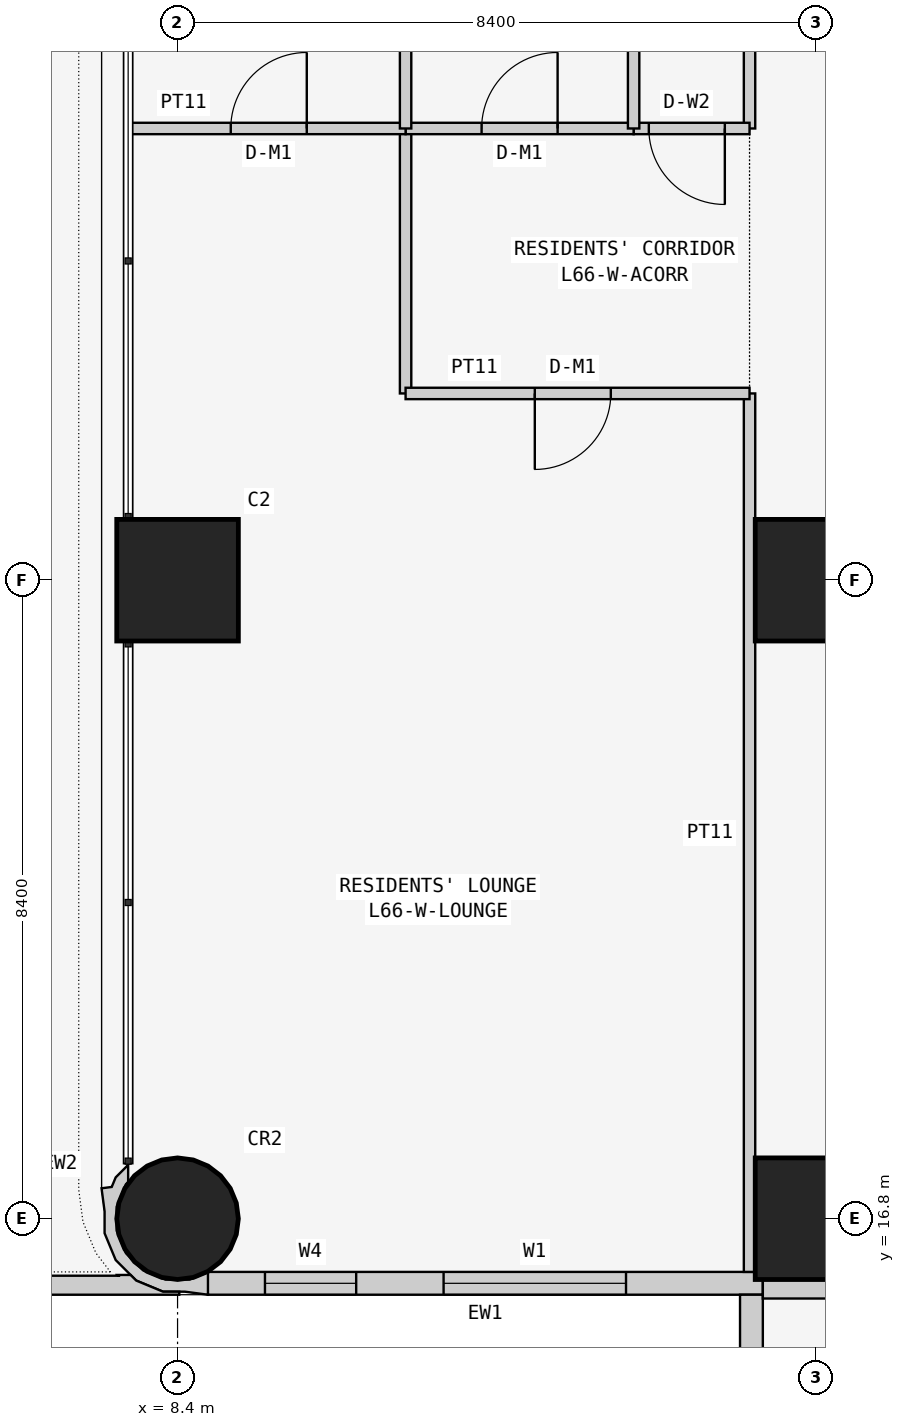
"""IFC4 building model, lengths in metres.
Left out: names, types, materials, properties, quantities, classifications, styles, units other than length and angle.
Written with IfcOpenShell. Run it as: python <this file> out.ifc"""

import sys

from ifc_helpers import new_model, si_unit, direction, frame, frame_2d, origin, origin_2d, place, context, subcontext, project, spatial, polyline, rectangle, circle, outline, extrude, element, fill, save


model = new_model("IFC4")
c1 = context("Model", 3, precision=1e-05, world=origin(), true_north=direction((0.0, 1.0)))
c2 = subcontext(c1, "Body", "Model", "MODEL_VIEW")
j1 = project(units=[si_unit("LENGTHUNIT", "METRE"), si_unit("PLANEANGLEUNIT", "RADIAN")], contexts=[c1])
p1 = place(None, origin())
s1 = spatial("IfcSite", under=j1, at=p1, CompositionType="ELEMENT")
p2 = place(p1, origin())
s2 = spatial("IfcBuilding", under=s1, at=p2, CompositionType="ELEMENT")
p3 = place(p2, frame((0.0, 0.0, 254.1)))
s3 = spatial("IfcBuildingStorey", under=s2, at=p3, CompositionType="ELEMENT", Elevation=254.1)
p4 = place(p3, frame((8.4, 16.8, 0.0), z_axis=(0.0, 0.0, 1.0), x_axis=(1.0, 0.0, 0.0)))
e1 = element("IfcColumn", 1, at=p4, inside=s3, PredefinedType="COLUMN", context=c2, shape_type="SweptSolid", body=[
    extrude(circle(Radius=0.8, at=origin_2d()), origin(), (0.0, 0.0, 1.0), 3.6),
])
for number, where, z_axis, x_axis in (
    (2, (8.4, 25.2, 0.0), (0.0, 0.0, 1.0), (1.0, 0.0, 0.0)),
    (3, (16.8, 16.8, 0.0), (0.0, 0.0, 1.0), (1.0, 0.0, 0.0)),
    (4, (16.8, 25.2, 0.0), (0.0, 0.0, 1.0), (1.0, 0.0, 0.0)),
):
    element("IfcColumn", number, at=place(p3, frame(where, z_axis=z_axis, x_axis=x_axis)), inside=s3, PredefinedType="COLUMN", context=c2, shape_type="SweptSolid", body=[
        extrude(rectangle(XDim=1.6, YDim=1.6, at=origin_2d()), origin(), (0.0, 0.0, 1.0), 3.6),
    ])
p5 = place(p3, frame((8.8, 15.95, 0.0), z_axis=(0.0, 0.0, 1.0), x_axis=(1.0, 0.0, 0.0)))
e5 = element("IfcWall", 5, at=p5, inside=s3, PredefinedType="SOLIDWALL", context=c2, shape_type="SweptSolid", body=[
    extrude(rectangle(XDim=7.3, YDim=0.3, at=frame_2d((3.65, 0.0))), origin(), (0.0, 0.0, 1.0), 3.45),
])
p6 = place(p5, frame((3.1, 0.0, 0.9)))
e6 = element("IfcOpeningElement", 6, at=p6, cuts=e5, PredefinedType="OPENING", context=c2, shape_type="SweptSolid", body=[
    extrude(rectangle(XDim=2.4, YDim=1.5, at=frame_2d((1.2, 0.75))), frame((0.0, 0.16, 0.0), z_axis=(0.0, -1.0, 0.0), x_axis=(1.0, 0.0, 0.0)), (0.0, 0.0, 1.0), 0.32),
])
p7 = place(p5, frame((0.75, 0.0, 0.9)))
e7 = element("IfcOpeningElement", 7, at=p7, cuts=e5, PredefinedType="OPENING", context=c2, shape_type="SweptSolid", body=[
    extrude(rectangle(XDim=1.2, YDim=1.5, at=frame_2d((0.6, 0.75))), frame((0.0, 0.16, 0.0), z_axis=(0.0, -1.0, 0.0), x_axis=(1.0, 0.0, 0.0)), (0.0, 0.0, 1.0), 0.32),
])
p8 = place(p3, frame((15.95, 15.8, 0.0), z_axis=(0.0, 0.0, 1.0), x_axis=(0.0, -1.0, 0.0)))
e8 = element("IfcWall", 8, at=p8, inside=s3, PredefinedType="SOLIDWALL", context=c2, shape_type="SweptSolid", body=[
    extrude(rectangle(XDim=7.0, YDim=0.3, at=frame_2d((3.5, 0.0))), origin(), (0.0, 0.0, 1.0), 3.45),
])
p9 = place(p8, frame((1.5, 0.0, 0.9)))
e9 = element("IfcOpeningElement", 9, at=p9, cuts=e8, PredefinedType="OPENING", context=c2, shape_type="SweptSolid", body=[
    extrude(rectangle(XDim=2.4, YDim=1.5, at=frame_2d((1.2, 0.75))), frame((0.0, 0.16, 0.0), z_axis=(0.0, -1.0, 0.0), x_axis=(1.0, 0.0, 0.0)), (0.0, 0.0, 1.0), 0.32),
])
p10 = place(p8, frame((5.05, 0.0, 0.9)))
e10 = element("IfcOpeningElement", 10, at=p10, cuts=e8, PredefinedType="OPENING", context=c2, shape_type="SweptSolid", body=[
    extrude(rectangle(XDim=1.2, YDim=1.5, at=frame_2d((0.6, 0.75))), frame((0.0, 0.16, 0.0), z_axis=(0.0, -1.0, 0.0), x_axis=(1.0, 0.0, 0.0)), (0.0, 0.0, 1.0), 0.32),
])
p11 = place(p3, frame((7.805, 17.448, 0.0), z_axis=(0.0, 0.0, 1.0), x_axis=(-0.93923434088, -0.343276641956, 0.0)))
e11 = element("IfcWall", 11, at=p11, inside=s3, PredefinedType="SOLIDWALL", context=c2, shape_type="SweptSolid", body=[
    extrude(outline(polyline([(-0.369, 1.89), (-0.509, 1.621), (-0.49, 1.614), (-0.479, 1.609), (-0.211, 1.62), (0.088, 1.511), (0.323, 1.295), (0.457, 1.006), (0.47, 0.688), (0.361, 0.389), (0.145, 0.154), (0.108, 0.137), (0.031, -0.075), (0.241, 0.023), (0.333, 0.124), (0.465, 0.094), (0.532, 0.393), (0.631, 0.663), (0.614, 1.045), (0.453, 1.391), (0.172, 1.649), (-0.097, 1.748), (-0.369, 1.89)])), origin(), (0.0, 0.0, 1.0), 3.45),
])
p12 = place(p3, origin())
e12 = element("IfcWall", 12, at=p12, inside=s3, PredefinedType="PARAPET", context=c2, shape_type="SweptSolid", body=[
    extrude(outline(polyline([(-0.3, 15.988), (-0.59, 16.21), (-0.812, 16.5), (-0.952, 16.838), (-1.0, 17.2), (-1.0, 41.6), (-0.952, 41.962), (-0.812, 42.3), (-0.59, 42.59), (-0.3, 42.812), (0.038, 42.952), (0.4, 43.0), (8.423, 43.0), (8.423, 42.96), (8.209, 42.96), (7.856, 42.814), (7.782, 42.74), (7.61, 42.74), (7.618, 42.75), (0.417, 42.75), (0.103, 42.709), (-0.174, 42.594), (-0.412, 42.412), (-0.594, 42.174), (-0.709, 41.897), (-0.75, 41.583), (-0.75, 17.216), (-0.709, 16.903), (-0.594, 16.626), (-0.412, 16.388), (-0.174, 16.206), (0.103, 16.091), (0.417, 16.05), (7.618, 16.05), (7.61, 16.06), (7.782, 16.06), (7.856, 15.986), (8.209, 15.84), (8.423, 15.84), (8.423, 15.8), (0.4, 15.8), (0.038, 15.848), (-0.3, 15.988)])), origin(), (0.0, 0.0, 1.0), 1.25),
])
p13 = place(p3, frame((22.971, 15.875, 0.0), z_axis=(0.0, 0.0, 1.0), x_axis=(-1.0, 0.0, 0.0)))
e13 = element("IfcWall", 13, at=p13, inside=s3, PredefinedType="PARTITIONING", context=c2, shape_type="SweptSolid", body=[
    extrude(rectangle(XDim=6.871, YDim=0.25, at=frame_2d((3.436, 0.0))), origin(), (0.0, 0.0, 1.0), 3.45),
])
for number, where, z_axis, x_axis in (
    (14, (15.925, 16.1, 0.0), (0.0, 0.0, 1.0), (0.0, 1.0, 0.0)),
    (15, (15.925, 31.143, 0.0), (0.0, 0.0, 1.0), (0.0, 1.0, 0.0)),
):
    element("IfcWall", number, at=place(p3, frame(where, z_axis=z_axis, x_axis=x_axis)), inside=s3, PredefinedType="PARTITIONING", context=c2, shape_type="SweptSolid", body=[
        extrude(rectangle(XDim=11.557, YDim=0.15, at=frame_2d((5.778, 0.0))), origin(), (0.0, 0.0, 1.0), 3.45),
    ])
p14 = place(p3, frame((11.4, 31.143, 0.0), z_axis=(0.0, 0.0, 1.0), x_axis=(0.0, -1.0, 0.0)))
e16 = element("IfcWall", 16, at=p14, inside=s3, PredefinedType="PARTITIONING", context=c2, shape_type="SweptSolid", body=[
    extrude(rectangle(XDim=3.486, YDim=0.15, at=frame_2d((1.743, 0.0))), origin(), (0.0, 0.0, 1.0), 3.45),
])
p15 = place(p3, frame((11.4, 27.657, 0.0), z_axis=(0.0, 0.0, 1.0), x_axis=(1.0, 0.0, 0.0)))
e17 = element("IfcWall", 17, at=p15, inside=s3, PredefinedType="PARTITIONING", context=c2, shape_type="SweptSolid", body=[
    extrude(rectangle(XDim=4.525, YDim=0.15, at=frame_2d((2.263, 0.0))), origin(), (0.0, 0.0, 1.0), 3.45),
])
p16 = place(p15, frame((1.7, 0.0, 0.0)))
e18 = element("IfcOpeningElement", 18, at=p16, cuts=e17, PredefinedType="OPENING", context=c2, shape_type="SweptSolid", body=[
    extrude(rectangle(XDim=1.0, YDim=2.1, at=frame_2d((0.5, 1.05))), frame((0.0, 0.085, 0.0), z_axis=(0.0, -1.0, 0.0), x_axis=(1.0, 0.0, 0.0)), (0.0, 0.0, 1.0), 0.17),
])
p17 = place(p3, frame((15.925, 31.143, 0.0), z_axis=(0.0, 0.0, 1.0), x_axis=(-1.0, 0.0, 0.0)))
e19 = element("IfcWall", 19, at=p17, inside=s3, PredefinedType="PARTITIONING", context=c2, shape_type="SweptSolid", body=[
    extrude(rectangle(XDim=1.525, YDim=0.15, at=frame_2d((0.763, 0.0))), origin(), (0.0, 0.0, 1.0), 3.45),
])
p18 = place(p17, frame((0.325, 0.0, 0.0)))
e20 = element("IfcOpeningElement", 20, at=p18, cuts=e19, PredefinedType="OPENING", context=c2, shape_type="SweptSolid", body=[
    extrude(rectangle(XDim=1.0, YDim=2.1, at=frame_2d((0.5, 1.05))), frame((0.0, 0.085, 0.0), z_axis=(0.0, -1.0, 0.0), x_axis=(1.0, 0.0, 0.0)), (0.0, 0.0, 1.0), 0.17),
])
p19 = place(p3, frame((14.4, 31.143, 0.0), z_axis=(0.0, 0.0, 1.0), x_axis=(-1.0, 0.0, 0.0)))
e21 = element("IfcWall", 21, at=p19, inside=s3, PredefinedType="PARTITIONING", context=c2, shape_type="SweptSolid", body=[
    extrude(rectangle(XDim=3.0, YDim=0.15, at=frame_2d((1.5, 0.0))), origin(), (0.0, 0.0, 1.0), 3.45),
])
p20 = place(p19, frame((1.0, 0.0, 0.0)))
e22 = element("IfcOpeningElement", 22, at=p20, cuts=e21, PredefinedType="OPENING", context=c2, shape_type="SweptSolid", body=[
    extrude(rectangle(XDim=1.0, YDim=2.1, at=frame_2d((0.5, 1.05))), frame((0.0, 0.085, 0.0), z_axis=(0.0, -1.0, 0.0), x_axis=(1.0, 0.0, 0.0)), (0.0, 0.0, 1.0), 0.17),
])
p21 = place(p3, frame((7.75, 31.143, 0.0), z_axis=(0.0, 0.0, 1.0), x_axis=(1.0, 0.0, 0.0)))
e23 = element("IfcWall", 23, at=p21, inside=s3, PredefinedType="PARTITIONING", context=c2, shape_type="SweptSolid", body=[
    extrude(rectangle(XDim=3.65, YDim=0.15, at=frame_2d((1.825, 0.0))), origin(), (0.0, 0.0, 1.0), 3.45),
])
p22 = place(p21, frame((1.35, 0.0, 0.0)))
e24 = element("IfcOpeningElement", 24, at=p22, cuts=e23, PredefinedType="OPENING", context=c2, shape_type="SweptSolid", body=[
    extrude(rectangle(XDim=1.0, YDim=2.1, at=frame_2d((0.5, 1.05))), frame((0.0, 0.085, 0.0), z_axis=(0.0, -1.0, 0.0), x_axis=(1.0, 0.0, 0.0)), (0.0, 0.0, 1.0), 0.17),
])
for number, where, z_axis, x_axis in (
    (25, (14.4, 42.7, 0.0), (0.0, 0.0, 1.0), (0.0, -1.0, 0.0)),
    (26, (11.4, 42.7, 0.0), (0.0, 0.0, 1.0), (0.0, -1.0, 0.0)),
):
    element("IfcWall", number, at=place(p3, frame(where, z_axis=z_axis, x_axis=x_axis)), inside=s3, PredefinedType="PARTITIONING", context=c2, shape_type="SweptSolid", body=[
        extrude(rectangle(XDim=11.557, YDim=0.15, at=frame_2d((5.778, 0.0))), origin(), (0.0, 0.0, 1.0), 3.45),
    ])
p23 = place(p6, origin())
e27 = element("IfcWindow", 27, at=p23, inside=s3, PartitioningType="SINGLE_PANEL", PredefinedType="WINDOW", context=c2, shape_type="SweptSolid", body=[
    extrude(rectangle(XDim=2.4, YDim=1.5, at=frame_2d((1.2, 0.75))), frame((0.0, 0.03, 0.0), z_axis=(0.0, -1.0, 0.0), x_axis=(1.0, 0.0, 0.0)), (0.0, 0.0, 1.0), 0.06),
])
fill(e6, e27)
p24 = place(p7, origin())
e28 = element("IfcWindow", 28, at=p24, inside=s3, PartitioningType="SINGLE_PANEL", PredefinedType="WINDOW", context=c2, shape_type="SweptSolid", body=[
    extrude(rectangle(XDim=1.2, YDim=1.5, at=frame_2d((0.6, 0.75))), frame((0.0, 0.03, 0.0), z_axis=(0.0, -1.0, 0.0), x_axis=(1.0, 0.0, 0.0)), (0.0, 0.0, 1.0), 0.06),
])
fill(e7, e28)
p25 = place(p16, frame((1.0, 0.0, 0.0), z_axis=(0.0, 0.0, 1.0), x_axis=(-1.0, 0.0, 0.0)))
e29 = element("IfcDoor", 29, at=p25, inside=s3, OperationType="SINGLE_SWING_RIGHT", PredefinedType="DOOR", context=c2, shape_type="SweptSolid", body=[
    extrude(rectangle(XDim=1.0, YDim=2.1, at=frame_2d((0.5, 1.05))), frame((0.0, 0.025, 0.0), z_axis=(0.0, -1.0, 0.0), x_axis=(1.0, 0.0, 0.0)), (0.0, 0.0, 1.0), 0.05),
])
fill(e18, e29)
p26 = place(p18, origin())
e30 = element("IfcDoor", 30, at=p26, inside=s3, OperationType="SINGLE_SWING_LEFT", PredefinedType="DOOR", context=c2, shape_type="SweptSolid", body=[
    extrude(rectangle(XDim=1.0, YDim=2.1, at=frame_2d((0.5, 1.05))), frame((0.0, 0.025, 0.0), z_axis=(0.0, -1.0, 0.0), x_axis=(1.0, 0.0, 0.0)), (0.0, 0.0, 1.0), 0.05),
])
fill(e20, e30)
p27 = place(p20, frame((1.0, 0.0, 0.0), z_axis=(0.0, 0.0, 1.0), x_axis=(-1.0, 0.0, 0.0)))
e31 = element("IfcDoor", 31, at=p27, inside=s3, OperationType="SINGLE_SWING_RIGHT", PredefinedType="DOOR", context=c2, shape_type="SweptSolid", body=[
    extrude(rectangle(XDim=1.0, YDim=2.1, at=frame_2d((0.5, 1.05))), frame((0.0, 0.025, 0.0), z_axis=(0.0, -1.0, 0.0), x_axis=(1.0, 0.0, 0.0)), (0.0, 0.0, 1.0), 0.05),
])
fill(e22, e31)
p28 = place(p22, origin())
e32 = element("IfcDoor", 32, at=p28, inside=s3, OperationType="SINGLE_SWING_RIGHT", PredefinedType="DOOR", context=c2, shape_type="SweptSolid", body=[
    extrude(rectangle(XDim=1.0, YDim=2.1, at=frame_2d((0.5, 1.05))), frame((0.0, 0.025, 0.0), z_axis=(0.0, -1.0, 0.0), x_axis=(1.0, 0.0, 0.0)), (0.0, 0.0, 1.0), 0.05),
])
fill(e24, e32)
save(model, sys.argv[1])
